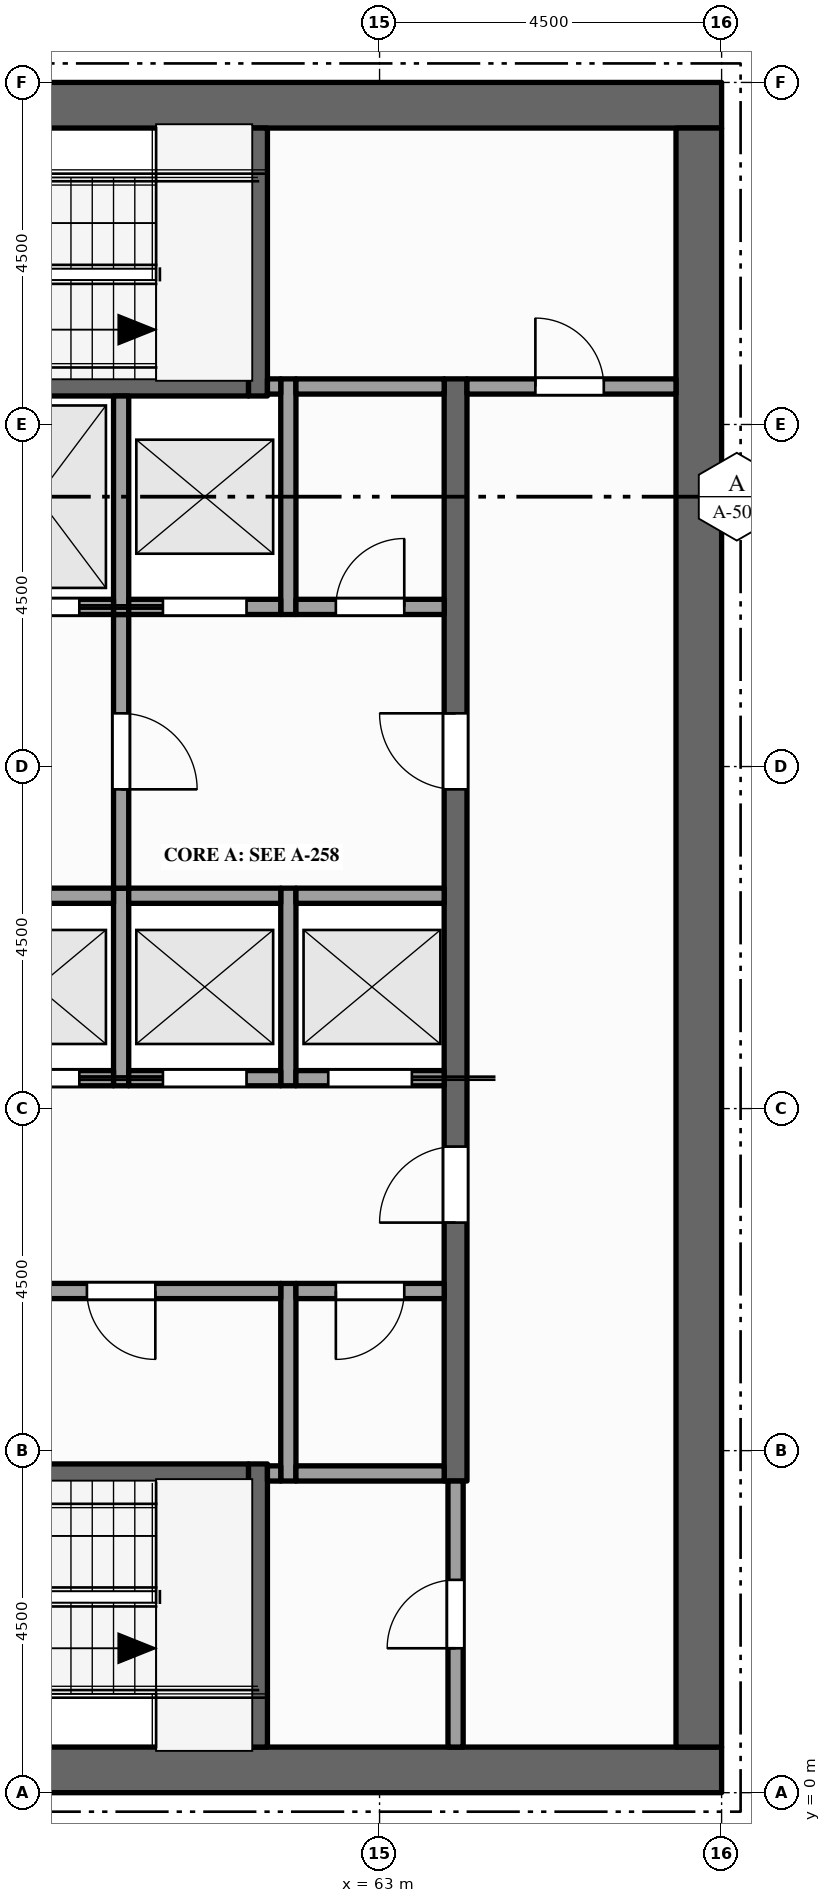
"""IFC4 building model, lengths in metres.
Left out: names, types, materials, properties, quantities, classifications, styles, units other than length and angle.
Written with IfcOpenShell. Run it as: python <this file> out.ifc"""

import sys

from ifc_helpers import new_model, si_unit, direction, frame, frame_2d, origin, place, context, subcontext, project, spatial, rectangle, extrude, element, fill, save


model = new_model("IFC4")
c1 = context("Model", 3, precision=1e-05, world=origin(), true_north=direction((0.0, 1.0)))
c2 = subcontext(c1, "Body", "Model", "MODEL_VIEW")
j1 = project(units=[si_unit("LENGTHUNIT", "METRE"), si_unit("PLANEANGLEUNIT", "RADIAN")], contexts=[c1])
p1 = place(None, origin())
s1 = spatial("IfcSite", under=j1, at=p1, CompositionType="ELEMENT")
p2 = place(p1, origin())
s2 = spatial("IfcBuilding", under=s1, at=p2, CompositionType="ELEMENT")
p3 = place(p2, frame((0.0, 0.0, 323.0)))
s3 = spatial("IfcBuildingStorey", under=s2, at=p3, CompositionType="ELEMENT", Elevation=323.0)
for number, where, z_axis, x_axis in (
    (1, (67.5, 0.3, -0.15), (0.0, 0.0, 1.0), (-1.0, 0.0, 0.0)),
    (2, (54.0, 22.2, -0.15), (0.0, 0.0, 1.0), (1.0, 0.0, 0.0)),
):
    element("IfcWall", number, at=place(p3, frame(where, z_axis=z_axis, x_axis=x_axis)), inside=s3, PredefinedType="SHEAR", context=c2, shape_type="SweptSolid", body=[
        extrude(rectangle(XDim=13.5, YDim=0.6, at=frame_2d((6.75, 0.0))), origin(), (0.0, 0.0, 1.0), 4.5),
    ])
p4 = place(p3, frame((67.2, 0.6, -0.15), z_axis=(0.0, 0.0, 1.0), x_axis=(0.0, 1.0, 0.0)))
e3 = element("IfcWall", 3, at=p4, inside=s3, PredefinedType="SHEAR", context=c2, shape_type="SweptSolid", body=[
    extrude(rectangle(XDim=21.3, YDim=0.6, at=frame_2d((10.65, 0.0))), origin(), (0.0, 0.0, 1.0), 4.5),
])
p5 = place(p3, frame((59.6, 9.3, 0.0), z_axis=(0.0, 0.0, 1.0), x_axis=(0.0, 1.0, 0.0)))
e4 = element("IfcWall", 4, at=p5, inside=s3, PredefinedType="SOLIDWALL", context=c2, shape_type="SweptSolid", body=[
    extrude(rectangle(XDim=2.6, YDim=0.2, at=frame_2d((1.3, 0.0))), origin(), (0.0, 0.0, 1.0), 4.35),
])
p6 = place(p3, frame((59.6, 11.9, 0.0), z_axis=(0.0, 0.0, 1.0), x_axis=(0.0, 1.0, 0.0)))
e5 = element("IfcWall", 5, at=p6, inside=s3, PredefinedType="PARTITIONING", context=c2, shape_type="SweptSolid", body=[
    extrude(rectangle(XDim=3.6, YDim=0.2, at=frame_2d((1.8, 0.0))), origin(), (0.0, 0.0, 1.0), 4.35),
])
p7 = place(p6, frame((1.3, 0.0, 0.0)))
e6 = element("IfcOpeningElement", 6, at=p7, cuts=e5, PredefinedType="OPENING", context=c2, shape_type="SweptSolid", body=[
    extrude(rectangle(XDim=1.0, YDim=2.1, at=frame_2d((0.5, 1.05))), frame((0.0, 0.11, 0.0), z_axis=(0.0, -1.0, 0.0), x_axis=(1.0, 0.0, 0.0)), (0.0, 0.0, 1.0), 0.22),
])
p8 = place(p3, frame((59.6, 15.5, 0.0), z_axis=(0.0, 0.0, 1.0), x_axis=(0.0, 1.0, 0.0)))
e7 = element("IfcWall", 7, at=p8, inside=s3, PredefinedType="SOLIDWALL", context=c2, shape_type="SweptSolid", body=[
    extrude(rectangle(XDim=2.875, YDim=0.2, at=frame_2d((1.438, 0.0))), origin(), (0.0, 0.0, 1.0), 4.35),
])
p9 = place(p3, frame((61.4, 0.6, 0.0), z_axis=(0.0, 0.0, 1.0), x_axis=(0.0, 1.0, 0.0)))
e8 = element("IfcWall", 8, at=p9, inside=s3, PredefinedType="SHEAR", context=c2, shape_type="SweptSolid", body=[
    extrude(rectangle(XDim=3.725, YDim=0.25, at=frame_2d((1.862, 0.0))), origin(), (0.0, 0.0, 1.0), 4.35),
])
p10 = place(p3, frame((61.4, 18.375, 0.0), z_axis=(0.0, 0.0, 1.0), x_axis=(0.0, 1.0, 0.0)))
e9 = element("IfcWall", 9, at=p10, inside=s3, PredefinedType="SHEAR", context=c2, shape_type="SweptSolid", body=[
    extrude(rectangle(XDim=3.525, YDim=0.25, at=frame_2d((1.762, 0.0))), origin(), (0.0, 0.0, 1.0), 4.35),
])
p11 = place(p3, frame((61.8, 4.1, 0.0), z_axis=(0.0, 0.0, 1.0), x_axis=(0.0, 1.0, 0.0)))
e10 = element("IfcWall", 10, at=p11, inside=s3, PredefinedType="PARTITIONING", context=c2, shape_type="SweptSolid", body=[
    extrude(rectangle(XDim=2.6, YDim=0.2, at=frame_2d((1.3, 0.0))), origin(), (0.0, 0.0, 1.0), 4.35),
])
p12 = place(p3, frame((61.8, 9.3, 0.0), z_axis=(0.0, 0.0, 1.0), x_axis=(0.0, 1.0, 0.0)))
e11 = element("IfcWall", 11, at=p12, inside=s3, PredefinedType="SOLIDWALL", context=c2, shape_type="SweptSolid", body=[
    extrude(rectangle(XDim=2.6, YDim=0.2, at=frame_2d((1.3, 0.0))), origin(), (0.0, 0.0, 1.0), 4.35),
])
p13 = place(p3, frame((61.8, 15.5, 0.0), z_axis=(0.0, 0.0, 1.0), x_axis=(0.0, 1.0, 0.0)))
e12 = element("IfcWall", 12, at=p13, inside=s3, PredefinedType="SOLIDWALL", context=c2, shape_type="SweptSolid", body=[
    extrude(rectangle(XDim=3.1, YDim=0.2, at=frame_2d((1.55, 0.0))), origin(), (0.0, 0.0, 1.0), 4.35),
])
p14 = place(p3, frame((64.0, 0.6, 0.0), z_axis=(0.0, 0.0, 1.0), x_axis=(0.0, 1.0, 0.0)))
e13 = element("IfcWall", 13, at=p14, inside=s3, PredefinedType="PARTITIONING", context=c2, shape_type="SweptSolid", body=[
    extrude(rectangle(XDim=3.5, YDim=0.2, at=frame_2d((1.75, 0.0))), origin(), (0.0, 0.0, 1.0), 4.35),
])
p15 = place(p14, frame((1.3, 0.0, 0.0)))
e14 = element("IfcOpeningElement", 14, at=p15, cuts=e13, PredefinedType="OPENING", context=c2, shape_type="SweptSolid", body=[
    extrude(rectangle(XDim=0.9, YDim=2.1, at=frame_2d((0.45, 1.05))), frame((0.0, 0.11, 0.0), z_axis=(0.0, -1.0, 0.0), x_axis=(1.0, 0.0, 0.0)), (0.0, 0.0, 1.0), 0.22),
])
p16 = place(p3, frame((64.0, 4.1, 0.0), z_axis=(0.0, 0.0, 1.0), x_axis=(0.0, 1.0, 0.0)))
e15 = element("IfcWall", 15, at=p16, inside=s3, PredefinedType="SHEAR", context=c2, shape_type="SweptSolid", body=[
    extrude(rectangle(XDim=14.5, YDim=0.3, at=frame_2d((7.25, 0.0))), origin(), (0.0, 0.0, 1.0), 4.35),
])
p17 = place(p16, frame((3.4, 0.0, 0.0)))
e16 = element("IfcOpeningElement", 16, at=p17, cuts=e15, PredefinedType="OPENING", context=c2, shape_type="SweptSolid", body=[
    extrude(rectangle(XDim=1.0, YDim=2.1, at=frame_2d((0.5, 1.05))), frame((0.0, 0.16, 0.0), z_axis=(0.0, -1.0, 0.0), x_axis=(1.0, 0.0, 0.0)), (0.0, 0.0, 1.0), 0.32),
])
p18 = place(p16, frame((9.1, 0.0, 0.0)))
e17 = element("IfcOpeningElement", 17, at=p18, cuts=e15, PredefinedType="OPENING", context=c2, shape_type="SweptSolid", body=[
    extrude(rectangle(XDim=1.0, YDim=2.1, at=frame_2d((0.5, 1.05))), frame((0.0, 0.16, 0.0), z_axis=(0.0, -1.0, 0.0), x_axis=(1.0, 0.0, 0.0)), (0.0, 0.0, 1.0), 0.32),
])
p19 = place(p3, frame((54.6, 4.2, 0.0), z_axis=(0.0, 0.0, 1.0), x_axis=(1.0, 0.0, 0.0)))
e18 = element("IfcWall", 18, at=p19, inside=s3, PredefinedType="SHEAR", context=c2, shape_type="SweptSolid", body=[
    extrude(rectangle(XDim=6.675, YDim=0.25, at=frame_2d((3.337, 0.0))), origin(), (0.0, 0.0, 1.0), 4.35),
])
p20 = place(p3, frame((61.525, 4.2, 0.0), z_axis=(0.0, 0.0, 1.0), x_axis=(1.0, 0.0, 0.0)))
e19 = element("IfcWall", 19, at=p20, inside=s3, PredefinedType="PARTITIONING", context=c2, shape_type="SweptSolid", body=[
    extrude(rectangle(XDim=0.175, YDim=0.2, at=frame_2d((0.087, 0.0))), origin(), (0.0, 0.0, 1.0), 4.35),
])
p21 = place(p3, frame((61.9, 4.2, 0.0), z_axis=(0.0, 0.0, 1.0), x_axis=(1.0, 0.0, 0.0)))
e20 = element("IfcWall", 20, at=p21, inside=s3, PredefinedType="PARTITIONING", context=c2, shape_type="SweptSolid", body=[
    extrude(rectangle(XDim=1.95, YDim=0.2, at=frame_2d((0.975, 0.0))), origin(), (0.0, 0.0, 1.0), 4.35),
])
p22 = place(p3, frame((57.5, 6.6, 0.0), z_axis=(0.0, 0.0, 1.0), x_axis=(1.0, 0.0, 0.0)))
e21 = element("IfcWall", 21, at=p22, inside=s3, PredefinedType="PARTITIONING", context=c2, shape_type="SweptSolid", body=[
    extrude(rectangle(XDim=4.2, YDim=0.2, at=frame_2d((2.1, 0.0))), origin(), (0.0, 0.0, 1.0), 4.35),
])
p23 = place(p22, frame((1.65, 0.0, 0.0)))
e22 = element("IfcOpeningElement", 22, at=p23, cuts=e21, PredefinedType="OPENING", context=c2, shape_type="SweptSolid", body=[
    extrude(rectangle(XDim=0.9, YDim=2.1, at=frame_2d((0.45, 1.05))), frame((0.0, 0.11, 0.0), z_axis=(0.0, -1.0, 0.0), x_axis=(1.0, 0.0, 0.0)), (0.0, 0.0, 1.0), 0.22),
])
p24 = place(p3, frame((61.9, 6.6, 0.0), z_axis=(0.0, 0.0, 1.0), x_axis=(1.0, 0.0, 0.0)))
e23 = element("IfcWall", 23, at=p24, inside=s3, PredefinedType="PARTITIONING", context=c2, shape_type="SweptSolid", body=[
    extrude(rectangle(XDim=1.95, YDim=0.2, at=frame_2d((0.975, 0.0))), origin(), (0.0, 0.0, 1.0), 4.35),
])
p25 = place(p24, frame((0.525, 0.0, 0.0)))
e24 = element("IfcOpeningElement", 24, at=p25, cuts=e23, PredefinedType="OPENING", context=c2, shape_type="SweptSolid", body=[
    extrude(rectangle(XDim=0.9, YDim=2.1, at=frame_2d((0.45, 1.05))), frame((0.0, 0.11, 0.0), z_axis=(0.0, -1.0, 0.0), x_axis=(1.0, 0.0, 0.0)), (0.0, 0.0, 1.0), 0.22),
])
p26 = place(p3, frame((57.5, 9.4, 0.0), z_axis=(0.0, 0.0, 1.0), x_axis=(1.0, 0.0, 0.0)))
e25 = element("IfcWall", 25, at=p26, inside=s3, PredefinedType="SOLIDWALL", context=c2, shape_type="SweptSolid", body=[
    extrude(rectangle(XDim=2.0, YDim=0.2, at=frame_2d((1.0, 0.0))), origin(), (0.0, 0.0, 1.0), 4.35),
])
p27 = place(p26, frame((0.45, 0.0, 0.012)))
e26 = element("IfcOpeningElement", 26, at=p27, cuts=e25, PredefinedType="OPENING", context=c2, shape_type="SweptSolid", body=[
    extrude(rectangle(XDim=1.1, YDim=2.1, at=frame_2d((0.55, 1.05))), frame((0.0, 0.11, 0.0), z_axis=(0.0, -1.0, 0.0), x_axis=(1.0, 0.0, 0.0)), (0.0, 0.0, 1.0), 0.22),
])
p28 = place(p3, frame((59.7, 9.4, 0.0), z_axis=(0.0, 0.0, 1.0), x_axis=(1.0, 0.0, 0.0)))
e27 = element("IfcWall", 27, at=p28, inside=s3, PredefinedType="SOLIDWALL", context=c2, shape_type="SweptSolid", body=[
    extrude(rectangle(XDim=2.0, YDim=0.2, at=frame_2d((1.0, 0.0))), origin(), (0.0, 0.0, 1.0), 4.35),
])
p29 = place(p28, frame((0.45, 0.0, 0.012)))
e28 = element("IfcOpeningElement", 28, at=p29, cuts=e27, PredefinedType="OPENING", context=c2, shape_type="SweptSolid", body=[
    extrude(rectangle(XDim=1.1, YDim=2.1, at=frame_2d((0.55, 1.05))), frame((0.0, 0.11, 0.0), z_axis=(0.0, -1.0, 0.0), x_axis=(1.0, 0.0, 0.0)), (0.0, 0.0, 1.0), 0.22),
])
p30 = place(p3, frame((61.9, 9.4, 0.0), z_axis=(0.0, 0.0, 1.0), x_axis=(1.0, 0.0, 0.0)))
e29 = element("IfcWall", 29, at=p30, inside=s3, PredefinedType="SOLIDWALL", context=c2, shape_type="SweptSolid", body=[
    extrude(rectangle(XDim=1.95, YDim=0.2, at=frame_2d((0.975, 0.0))), origin(), (0.0, 0.0, 1.0), 4.35),
])
p31 = place(p30, frame((0.425, 0.0, 0.012)))
e30 = element("IfcOpeningElement", 30, at=p31, cuts=e29, PredefinedType="OPENING", context=c2, shape_type="SweptSolid", body=[
    extrude(rectangle(XDim=1.1, YDim=2.1, at=frame_2d((0.55, 1.05))), frame((0.0, 0.11, 0.0), z_axis=(0.0, -1.0, 0.0), x_axis=(1.0, 0.0, 0.0)), (0.0, 0.0, 1.0), 0.22),
])
for number, where, z_axis, x_axis in (
    (31, (57.5, 11.8, 0.0), (0.0, 0.0, 1.0), (1.0, 0.0, 0.0)),
    (32, (59.7, 11.8, 0.0), (0.0, 0.0, 1.0), (1.0, 0.0, 0.0)),
):
    element("IfcWall", number, at=place(p3, frame(where, z_axis=z_axis, x_axis=x_axis)), inside=s3, PredefinedType="SOLIDWALL", context=c2, shape_type="SweptSolid", body=[
        extrude(rectangle(XDim=2.0, YDim=0.2, at=frame_2d((1.0, 0.0))), origin(), (0.0, 0.0, 1.0), 4.35),
    ])
p32 = place(p3, frame((61.9, 11.8, 0.0), z_axis=(0.0, 0.0, 1.0), x_axis=(1.0, 0.0, 0.0)))
e33 = element("IfcWall", 33, at=p32, inside=s3, PredefinedType="SOLIDWALL", context=c2, shape_type="SweptSolid", body=[
    extrude(rectangle(XDim=1.95, YDim=0.2, at=frame_2d((0.975, 0.0))), origin(), (0.0, 0.0, 1.0), 4.35),
])
p33 = place(p3, frame((57.5, 15.6, 0.0), z_axis=(0.0, 0.0, 1.0), x_axis=(1.0, 0.0, 0.0)))
e34 = element("IfcWall", 34, at=p33, inside=s3, PredefinedType="SOLIDWALL", context=c2, shape_type="SweptSolid", body=[
    extrude(rectangle(XDim=2.0, YDim=0.2, at=frame_2d((1.0, 0.0))), origin(), (0.0, 0.0, 1.0), 4.35),
])
p34 = place(p33, frame((0.45, 0.0, 0.012)))
e35 = element("IfcOpeningElement", 35, at=p34, cuts=e34, PredefinedType="OPENING", context=c2, shape_type="SweptSolid", body=[
    extrude(rectangle(XDim=1.1, YDim=2.1, at=frame_2d((0.55, 1.05))), frame((0.0, 0.11, 0.0), z_axis=(0.0, -1.0, 0.0), x_axis=(1.0, 0.0, 0.0)), (0.0, 0.0, 1.0), 0.22),
])
p35 = place(p3, frame((59.7, 15.6, 0.0), z_axis=(0.0, 0.0, 1.0), x_axis=(1.0, 0.0, 0.0)))
e36 = element("IfcWall", 36, at=p35, inside=s3, PredefinedType="SOLIDWALL", context=c2, shape_type="SweptSolid", body=[
    extrude(rectangle(XDim=2.0, YDim=0.2, at=frame_2d((1.0, 0.0))), origin(), (0.0, 0.0, 1.0), 4.35),
])
p36 = place(p35, frame((0.45, 0.0, 0.012)))
e37 = element("IfcOpeningElement", 37, at=p36, cuts=e36, PredefinedType="OPENING", context=c2, shape_type="SweptSolid", body=[
    extrude(rectangle(XDim=1.1, YDim=2.1, at=frame_2d((0.55, 1.05))), frame((0.0, 0.11, 0.0), z_axis=(0.0, -1.0, 0.0), x_axis=(1.0, 0.0, 0.0)), (0.0, 0.0, 1.0), 0.22),
])
p37 = place(p3, frame((61.9, 15.6, 0.0), z_axis=(0.0, 0.0, 1.0), x_axis=(1.0, 0.0, 0.0)))
e38 = element("IfcWall", 38, at=p37, inside=s3, PredefinedType="PARTITIONING", context=c2, shape_type="SweptSolid", body=[
    extrude(rectangle(XDim=1.95, YDim=0.2, at=frame_2d((0.975, 0.0))), origin(), (0.0, 0.0, 1.0), 4.35),
])
p38 = place(p37, frame((0.525, 0.0, 0.0)))
e39 = element("IfcOpeningElement", 39, at=p38, cuts=e38, PredefinedType="OPENING", context=c2, shape_type="SweptSolid", body=[
    extrude(rectangle(XDim=0.9, YDim=2.1, at=frame_2d((0.45, 1.05))), frame((0.0, 0.11, 0.0), z_axis=(0.0, -1.0, 0.0), x_axis=(1.0, 0.0, 0.0)), (0.0, 0.0, 1.0), 0.22),
])
p39 = place(p3, frame((54.6, 18.5, 0.0), z_axis=(0.0, 0.0, 1.0), x_axis=(1.0, 0.0, 0.0)))
e40 = element("IfcWall", 40, at=p39, inside=s3, PredefinedType="SHEAR", context=c2, shape_type="SweptSolid", body=[
    extrude(rectangle(XDim=6.675, YDim=0.25, at=frame_2d((3.337, 0.0))), origin(), (0.0, 0.0, 1.0), 4.35),
])
p40 = place(p3, frame((61.525, 18.5, 0.0), z_axis=(0.0, 0.0, 1.0), x_axis=(1.0, 0.0, 0.0)))
e41 = element("IfcWall", 41, at=p40, inside=s3, PredefinedType="SOLIDWALL", context=c2, shape_type="SweptSolid", body=[
    extrude(rectangle(XDim=0.175, YDim=0.2, at=frame_2d((0.087, 0.0))), origin(), (0.0, 0.0, 1.0), 4.35),
])
p41 = place(p3, frame((61.9, 18.5, 0.0), z_axis=(0.0, 0.0, 1.0), x_axis=(1.0, 0.0, 0.0)))
e42 = element("IfcWall", 42, at=p41, inside=s3, PredefinedType="PARTITIONING", context=c2, shape_type="SweptSolid", body=[
    extrude(rectangle(XDim=1.95, YDim=0.2, at=frame_2d((0.975, 0.0))), origin(), (0.0, 0.0, 1.0), 4.35),
])
p42 = place(p3, frame((64.15, 18.5, 0.0), z_axis=(0.0, 0.0, 1.0), x_axis=(1.0, 0.0, 0.0)))
e43 = element("IfcWall", 43, at=p42, inside=s3, PredefinedType="PARTITIONING", context=c2, shape_type="SweptSolid", body=[
    extrude(rectangle(XDim=2.75, YDim=0.2, at=frame_2d((1.375, 0.0))), origin(), (0.0, 0.0, 1.0), 4.35),
])
p43 = place(p42, frame((0.9, 0.0, 0.0)))
e44 = element("IfcOpeningElement", 44, at=p43, cuts=e43, PredefinedType="OPENING", context=c2, shape_type="SweptSolid", body=[
    extrude(rectangle(XDim=0.9, YDim=2.1, at=frame_2d((0.45, 1.05))), frame((0.0, 0.11, 0.0), z_axis=(0.0, -1.0, 0.0), x_axis=(1.0, 0.0, 0.0)), (0.0, 0.0, 1.0), 0.22),
])
p44 = place(p27, origin())
e45 = element("IfcDoor", 45, at=p44, inside=s3, OperationType="SLIDING_TO_RIGHT", PredefinedType="DOOR", context=c2, shape_type="SweptSolid", body=[
    extrude(rectangle(XDim=1.1, YDim=2.1, at=frame_2d((0.55, 1.05))), frame((0.0, 0.025, 0.0), z_axis=(0.0, -1.0, 0.0), x_axis=(1.0, 0.0, 0.0)), (0.0, 0.0, 1.0), 0.05),
])
fill(e26, e45)
p45 = place(p29, origin())
e46 = element("IfcDoor", 46, at=p45, inside=s3, OperationType="SLIDING_TO_LEFT", PredefinedType="DOOR", context=c2, shape_type="SweptSolid", body=[
    extrude(rectangle(XDim=1.1, YDim=2.1, at=frame_2d((0.55, 1.05))), frame((0.0, 0.025, 0.0), z_axis=(0.0, -1.0, 0.0), x_axis=(1.0, 0.0, 0.0)), (0.0, 0.0, 1.0), 0.05),
])
fill(e28, e46)
p46 = place(p31, origin())
e47 = element("IfcDoor", 47, at=p46, inside=s3, OperationType="SLIDING_TO_RIGHT", PredefinedType="DOOR", context=c2, shape_type="SweptSolid", body=[
    extrude(rectangle(XDim=1.1, YDim=2.1, at=frame_2d((0.55, 1.05))), frame((0.0, 0.025, 0.0), z_axis=(0.0, -1.0, 0.0), x_axis=(1.0, 0.0, 0.0)), (0.0, 0.0, 1.0), 0.05),
])
fill(e30, e47)
p47 = place(p34, origin())
e48 = element("IfcDoor", 48, at=p47, inside=s3, OperationType="SLIDING_TO_RIGHT", PredefinedType="DOOR", context=c2, shape_type="SweptSolid", body=[
    extrude(rectangle(XDim=1.1, YDim=2.1, at=frame_2d((0.55, 1.05))), frame((0.0, 0.025, 0.0), z_axis=(0.0, -1.0, 0.0), x_axis=(1.0, 0.0, 0.0)), (0.0, 0.0, 1.0), 0.05),
])
fill(e35, e48)
p48 = place(p36, origin())
e49 = element("IfcDoor", 49, at=p48, inside=s3, OperationType="SLIDING_TO_LEFT", PredefinedType="DOOR", context=c2, shape_type="SweptSolid", body=[
    extrude(rectangle(XDim=1.1, YDim=2.1, at=frame_2d((0.55, 1.05))), frame((0.0, 0.025, 0.0), z_axis=(0.0, -1.0, 0.0), x_axis=(1.0, 0.0, 0.0)), (0.0, 0.0, 1.0), 0.05),
])
fill(e37, e49)
p49 = place(p17, origin())
e50 = element("IfcDoor", 50, at=p49, inside=s3, OperationType="SINGLE_SWING_LEFT", PredefinedType="DOOR", context=c2, shape_type="SweptSolid", body=[
    extrude(rectangle(XDim=1.0, YDim=2.1, at=frame_2d((0.5, 1.05))), frame((0.0, 0.025, 0.0), z_axis=(0.0, -1.0, 0.0), x_axis=(1.0, 0.0, 0.0)), (0.0, 0.0, 1.0), 0.05),
])
fill(e16, e50)
p50 = place(p7, origin())
e51 = element("IfcDoor", 51, at=p50, inside=s3, OperationType="SINGLE_SWING_LEFT", PredefinedType="DOOR", context=c2, shape_type="SweptSolid", body=[
    extrude(rectangle(XDim=1.0, YDim=2.1, at=frame_2d((0.5, 1.05))), frame((0.0, 0.025, 0.0), z_axis=(0.0, -1.0, 0.0), x_axis=(1.0, 0.0, 0.0)), (0.0, 0.0, 1.0), 0.05),
])
fill(e6, e51)
p51 = place(p18, origin())
e52 = element("IfcDoor", 52, at=p51, inside=s3, OperationType="SINGLE_SWING_RIGHT", PredefinedType="DOOR", context=c2, shape_type="SweptSolid", body=[
    extrude(rectangle(XDim=1.0, YDim=2.1, at=frame_2d((0.5, 1.05))), frame((0.0, 0.025, 0.0), z_axis=(0.0, -1.0, 0.0), x_axis=(1.0, 0.0, 0.0)), (0.0, 0.0, 1.0), 0.05),
])
fill(e17, e52)
p52 = place(p15, origin())
e53 = element("IfcDoor", 53, at=p52, inside=s3, OperationType="SINGLE_SWING_LEFT", PredefinedType="DOOR", context=c2, shape_type="SweptSolid", body=[
    extrude(rectangle(XDim=0.9, YDim=2.1, at=frame_2d((0.45, 1.05))), frame((0.0, 0.025, 0.0), z_axis=(0.0, -1.0, 0.0), x_axis=(1.0, 0.0, 0.0)), (0.0, 0.0, 1.0), 0.05),
])
fill(e14, e53)
p53 = place(p43, origin())
e54 = element("IfcDoor", 54, at=p53, inside=s3, OperationType="SINGLE_SWING_LEFT", PredefinedType="DOOR", context=c2, shape_type="SweptSolid", body=[
    extrude(rectangle(XDim=0.9, YDim=2.1, at=frame_2d((0.45, 1.05))), frame((0.0, 0.025, 0.0), z_axis=(0.0, -1.0, 0.0), x_axis=(1.0, 0.0, 0.0)), (0.0, 0.0, 1.0), 0.05),
])
fill(e44, e54)
p54 = place(p23, origin())
e55 = element("IfcDoor", 55, at=p54, inside=s3, OperationType="SINGLE_SWING_RIGHT", PredefinedType="DOOR", context=c2, shape_type="SweptSolid", body=[
    extrude(rectangle(XDim=0.9, YDim=2.1, at=frame_2d((0.45, 1.05))), frame((0.0, 0.025, 0.0), z_axis=(0.0, -1.0, 0.0), x_axis=(1.0, 0.0, 0.0)), (0.0, 0.0, 1.0), 0.05),
])
fill(e22, e55)
p55 = place(p25, origin())
e56 = element("IfcDoor", 56, at=p55, inside=s3, OperationType="SINGLE_SWING_LEFT", PredefinedType="DOOR", context=c2, shape_type="SweptSolid", body=[
    extrude(rectangle(XDim=0.9, YDim=2.1, at=frame_2d((0.45, 1.05))), frame((0.0, 0.025, 0.0), z_axis=(0.0, -1.0, 0.0), x_axis=(1.0, 0.0, 0.0)), (0.0, 0.0, 1.0), 0.05),
])
fill(e24, e56)
p56 = place(p38, origin())
e57 = element("IfcDoor", 57, at=p56, inside=s3, OperationType="SINGLE_SWING_RIGHT", PredefinedType="DOOR", context=c2, shape_type="SweptSolid", body=[
    extrude(rectangle(XDim=0.9, YDim=2.1, at=frame_2d((0.45, 1.05))), frame((0.0, 0.025, 0.0), z_axis=(0.0, -1.0, 0.0), x_axis=(1.0, 0.0, 0.0)), (0.0, 0.0, 1.0), 0.05),
])
fill(e39, e57)
save(model, sys.argv[1])
